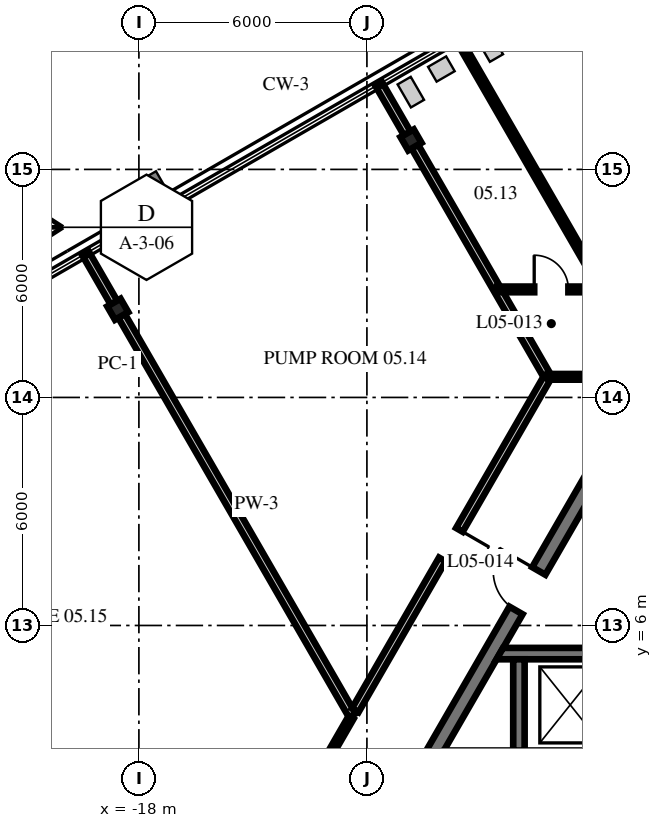
"""IFC4 building model, lengths in metres.
Left out: names, types, materials, properties, quantities, classifications, styles, units other than length and angle.
Written with IfcOpenShell. Run it as: python <this file> out.ifc"""

import sys

from ifc_helpers import new_model, si_unit, direction, frame, frame_2d, origin, origin_2d, place, context, subcontext, project, spatial, polyline, rectangle, i_section, outline, extrude, source, transform, mapped, element, fill, save


model = new_model("IFC4")
c1 = context("Model", 3, precision=1e-05, world=origin(), true_north=direction((0.0, 1.0)))
c2 = subcontext(c1, "Body", "Model", "MODEL_VIEW")
j1 = project(units=[si_unit("LENGTHUNIT", "METRE"), si_unit("PLANEANGLEUNIT", "RADIAN")], contexts=[c1])
p1 = place(None, origin())
s1 = spatial("IfcSite", under=j1, at=p1, CompositionType="ELEMENT")
p2 = place(p1, origin())
s2 = spatial("IfcBuilding", under=s1, at=p2, CompositionType="ELEMENT")
p3 = place(p2, frame((0.0, 0.0, 24.6)))
s3 = spatial("IfcBuildingStorey", under=s2, at=p3, CompositionType="ELEMENT", Elevation=24.6)
m1 = source(origin(), c2, "Body", "SweptSolid", [
    extrude(i_section(OverallWidth=0.404, OverallDepth=0.406, WebThickness=0.027, FlangeThickness=0.044, at=origin_2d()), origin(), (0.0, 0.0, 1.0), 4.3),
])
for number, where, z_axis, x_axis in (
    (1, (-10.84, 18.775, 0.0), (0.0, 0.0, 1.0), (-0.866, -0.5, 0.0)),
    (2, (-18.556, 14.32, 0.0), (0.0, 0.0, 1.0), (-0.866, -0.5, 0.0)),
):
    element("IfcColumn", number, at=place(p3, frame(where, z_axis=z_axis, x_axis=x_axis)), inside=s3, PredefinedType="COLUMN", context=c2, shape_type="MappedRepresentation", body=[
        mapped(m1, transform((0.0, 0.0, 0.0), scale=1.0)),
    ])
m2 = source(origin(), c2, "Body", "SweptSolid", [
    extrude(outline(polyline([(-0.115, -0.2), (11.885, -0.2), (11.654, 0.2), (0.115, 0.2), (-0.115, -0.2)])), origin(), (0.0, 0.0, 1.0), 4.1),
])
p4 = place(p3, frame((-5.885, 10.192, 0.0), z_axis=(0.0, 0.0, 1.0), x_axis=(-0.499996592174, -0.866027371285, 0.0)))
e3 = element("IfcWall", 3, at=p4, inside=s3, PredefinedType="SHEAR", context=c2, shape_type="MappedRepresentation", body=[
    mapped(m2, transform((0.0, 0.0, 0.0), scale=1.0)),
])
p5 = place(p4, frame((3.185, 0.0, 0.0)))
e4 = element("IfcOpeningElement", 4, at=p5, cuts=e3, PredefinedType="OPENING", context=c2, shape_type="SweptSolid", body=[
    extrude(rectangle(XDim=1.2, YDim=2.1, at=frame_2d((0.6, 1.05))), frame((0.0, 0.21, 0.0), z_axis=(0.0, -1.0, 0.0), x_axis=(1.0, 0.0, 0.0)), (0.0, 0.0, 1.0), 0.42),
])
m3 = source(origin(), c2, "Body", "SweptSolid", [
    extrude(outline(polyline([(2.6, -0.15), (-0.44, -0.15), (-0.267, 0.15), (2.6, 0.15), (2.6, -0.15)])), origin(), (0.0, 0.0, 1.0), 4.1),
])
p6 = place(p3, frame((-8.15, 5.26, 0.0), z_axis=(0.0, 0.0, 1.0), x_axis=(1.0, 0.0, 0.0)))
e5 = element("IfcWall", 5, at=p6, inside=s3, PredefinedType="SHEAR", context=c2, shape_type="MappedRepresentation", body=[
    mapped(m3, transform((0.0, 0.0, 0.0), scale=1.0)),
])
m4 = source(origin(), c2, "Body", "SweptSolid", [
    extrude(rectangle(XDim=2.4, YDim=0.3, at=frame_2d((1.2, 0.0))), origin(), (0.0, 0.0, 1.0), 4.1),
])
p7 = place(p3, frame((-8.0, 2.71, 0.0), z_axis=(0.0, 0.0, 1.0), x_axis=(0.0, 1.0, 0.0)))
e6 = element("IfcWall", 6, at=p7, inside=s3, PredefinedType="SHEAR", context=c2, shape_type="MappedRepresentation", body=[
    mapped(m4, transform((0.0, 0.0, 0.0), scale=1.0)),
])
m5 = source(origin(), c2, "Body", "SweptSolid", [
    extrude(rectangle(XDim=1.499, YDim=0.2, at=frame_2d((0.749, 0.0))), origin(), (0.0, 0.0, 1.0), 4.1),
])
p8 = place(p3, frame((-19.402, 15.785, 0.0), z_axis=(0.0, 0.0, 1.0), x_axis=(0.499976292358, -0.866039090965, 0.0)))
e7 = element("IfcWall", 7, at=p8, inside=s3, PredefinedType="PARTITIONING", context=c2, shape_type="MappedRepresentation", body=[
    mapped(m5, transform((0.0, 0.0, 0.0), scale=1.0)),
])
m6 = source(origin(), c2, "Body", "SweptSolid", [
    extrude(rectangle(XDim=12.148, YDim=0.2, at=frame_2d((6.074, 0.0))), origin(), (0.0, 0.0, 1.0), 3.343),
])
p9 = place(p3, frame((-18.459, 14.153, 0.0), z_axis=(0.0, 0.0, 1.0), x_axis=(0.500006022464, -0.866021926685, 0.0)))
e8 = element("IfcWall", 8, at=p9, inside=s3, PredefinedType="PARTITIONING", context=c2, shape_type="MappedRepresentation", body=[
    mapped(m6, transform((0.0, 0.0, 0.0), scale=1.0)),
])
p10 = place(p3, frame((-11.686, 20.24, 0.0), z_axis=(0.0, 0.0, 1.0), x_axis=(0.499976292358, -0.866039090965, 0.0)))
e9 = element("IfcWall", 9, at=p10, inside=s3, PredefinedType="PARTITIONING", context=c2, shape_type="MappedRepresentation", body=[
    mapped(m5, transform((0.0, 0.0, 0.0), scale=1.0)),
])
m7 = source(origin(), c2, "Body", "SweptSolid", [
    extrude(rectangle(XDim=6.934, YDim=0.2, at=frame_2d((3.467, 0.0))), origin(), (0.0, 0.0, 1.0), 3.488),
])
p11 = place(p3, frame((-10.743, 18.608, 0.0), z_axis=(0.0, 0.0, 1.0), x_axis=(0.499986605379, -0.866033137035, 0.0)))
e10 = element("IfcWall", 10, at=p11, inside=s3, PredefinedType="PARTITIONING", context=c2, shape_type="MappedRepresentation", body=[
    mapped(m7, transform((0.0, 0.0, 0.0), scale=1.0)),
])
m8 = source(origin(), c2, "Body", "SweptSolid", [
    extrude(rectangle(XDim=7.509, YDim=0.15, at=frame_2d((3.754, 0.0))), origin(), (0.0, 0.0, 1.0), 4.1),
])
p12 = place(p3, frame((-9.607, 21.44, 0.0), z_axis=(0.0, 0.0, 1.0), x_axis=(0.500006720231, -0.866021523823, 0.0)))
e11 = element("IfcWall", 11, at=p12, inside=s3, PredefinedType="PARTITIONING", context=c2, shape_type="MappedRepresentation", body=[
    mapped(m8, transform((0.0, 0.0, 0.0), scale=1.0)),
])
m9 = source(origin(), c2, "Body", "SweptSolid", [
    extrude(rectangle(XDim=10.155, YDim=0.15, at=frame_2d((5.077, 0.0))), origin(), (0.0, 0.0, 1.0), 4.1),
])
p13 = place(p3, frame((-7.241, 12.542, 0.0), z_axis=(0.0, 0.0, 1.0), x_axis=(1.0, 0.0, 0.0)))
e12 = element("IfcWall", 12, at=p13, inside=s3, PredefinedType="PARTITIONING", context=c2, shape_type="MappedRepresentation", body=[
    mapped(m9, transform((0.0, 0.0, 0.0), scale=1.0)),
])
p14 = place(p13, frame((4.738, 0.0, 0.0)))
e13 = element("IfcOpeningElement", 13, at=p14, cuts=e12, PredefinedType="OPENING", context=c2, shape_type="SweptSolid", body=[
    extrude(rectangle(XDim=0.9, YDim=2.1, at=frame_2d((0.45, 1.05))), frame((0.0, 0.085, 0.0), z_axis=(0.0, -1.0, 0.0), x_axis=(1.0, 0.0, 0.0)), (0.0, 0.0, 1.0), 0.17),
])
m10 = source(origin(), c2, "Body", "SweptSolid", [
    extrude(rectangle(XDim=10.158, YDim=0.15, at=frame_2d((5.079, 0.0))), origin(), (0.0, 0.0, 1.0), 4.1),
])
p15 = place(p3, frame((-8.569, 14.842, 0.0), z_axis=(0.0, 0.0, 1.0), x_axis=(1.0, 0.0, 0.0)))
e14 = element("IfcWall", 14, at=p15, inside=s3, PredefinedType="PARTITIONING", context=c2, shape_type="MappedRepresentation", body=[
    mapped(m10, transform((0.0, 0.0, 0.0), scale=1.0)),
])
p16 = place(p15, frame((8.338, 0.0, 0.0)))
e15 = element("IfcOpeningElement", 15, at=p16, cuts=e14, PredefinedType="OPENING", context=c2, shape_type="SweptSolid", body=[
    extrude(rectangle(XDim=0.9, YDim=2.1, at=frame_2d((0.45, 1.05))), frame((0.0, 0.085, 0.0), z_axis=(0.0, -1.0, 0.0), x_axis=(1.0, 0.0, 0.0)), (0.0, 0.0, 1.0), 0.17),
])
p17 = place(p15, frame((4.531, 0.0, 0.0)))
e16 = element("IfcOpeningElement", 16, at=p17, cuts=e14, PredefinedType="OPENING", context=c2, shape_type="SweptSolid", body=[
    extrude(rectangle(XDim=0.9, YDim=2.1, at=frame_2d((0.45, 1.05))), frame((0.0, 0.085, 0.0), z_axis=(0.0, -1.0, 0.0), x_axis=(1.0, 0.0, 0.0)), (0.0, 0.0, 1.0), 0.17),
])
p18 = place(p15, frame((0.971, 0.0, 0.0)))
e17 = element("IfcOpeningElement", 17, at=p18, cuts=e14, PredefinedType="OPENING", context=c2, shape_type="SweptSolid", body=[
    extrude(rectangle(XDim=0.9, YDim=2.1, at=frame_2d((0.45, 1.05))), frame((0.0, 0.085, 0.0), z_axis=(0.0, -1.0, 0.0), x_axis=(1.0, 0.0, 0.0)), (0.0, 0.0, 1.0), 0.17),
])
m11 = source(origin(), c2, "Body", "SweptSolid", [
    extrude(rectangle(XDim=4.111, YDim=0.15, at=frame_2d((2.056, 0.0))), origin(), (0.0, 0.0, 1.0), 4.1),
])
p19 = place(p3, frame((-14.473, 0.017, 0.0), z_axis=(0.0, 0.0, 1.0), x_axis=(0.500022314862, 0.866012519909, 0.0)))
e18 = element("IfcWall", 18, at=p19, inside=s3, PredefinedType="PARTITIONING", context=c2, shape_type="MappedRepresentation", body=[
    mapped(m11, transform((0.0, 0.0, 0.0), scale=1.0)),
])
p20 = place(p19, frame((1.625, 0.0, 0.0)))
e19 = element("IfcOpeningElement", 19, at=p20, cuts=e18, PredefinedType="OPENING", context=c2, shape_type="SweptSolid", body=[
    extrude(rectangle(XDim=0.9, YDim=2.1, at=frame_2d((0.45, 1.05))), frame((0.0, 0.085, 0.0), z_axis=(0.0, -1.0, 0.0), x_axis=(1.0, 0.0, 0.0)), (0.0, 0.0, 1.0), 0.17),
])
m12 = source(origin(), c2, "Body", "SweptSolid", [
    extrude(rectangle(XDim=10.082, YDim=0.2, at=frame_2d((5.041, 0.0))), origin(), (0.0, 0.0, 1.0), 4.1),
])
p21 = place(p3, frame((-12.307, 3.768, 0.0), z_axis=(0.0, 0.0, 1.0), x_axis=(0.500014523669, 0.866017018378, 0.0)))
e20 = element("IfcWall", 20, at=p21, inside=s3, PredefinedType="PARTITIONING", context=c2, shape_type="MappedRepresentation", body=[
    mapped(m12, transform((0.0, 0.0, 0.0), scale=1.0)),
])
p22 = place(p21, frame((4.582, 0.0, 0.0)))
e21 = element("IfcOpeningElement", 21, at=p22, cuts=e20, PredefinedType="OPENING", context=c2, shape_type="SweptSolid", body=[
    extrude(rectangle(XDim=0.9, YDim=2.1, at=frame_2d((0.45, 1.05))), frame((0.0, 0.11, 0.0), z_axis=(0.0, -1.0, 0.0), x_axis=(1.0, 0.0, 0.0)), (0.0, 0.0, 1.0), 0.22),
])
p23 = place(p5, frame((1.2, 0.0, 0.0), z_axis=(0.0, 0.0, 1.0), x_axis=(-1.0, 0.0, 0.0)))
e22 = element("IfcDoor", 22, at=p23, inside=s3, OperationType="SINGLE_SWING_RIGHT", PredefinedType="DOOR", context=c2, shape_type="SweptSolid", body=[
    extrude(rectangle(XDim=1.2, YDim=2.1, at=frame_2d((0.6, 1.05))), frame((0.0, 0.025, 0.0), z_axis=(0.0, -1.0, 0.0), x_axis=(1.0, 0.0, 0.0)), (0.0, 0.0, 1.0), 0.05),
])
fill(e4, e22)
p24 = place(p18, origin())
e23 = element("IfcDoor", 23, at=p24, inside=s3, OperationType="SINGLE_SWING_LEFT", PredefinedType="DOOR", context=c2, shape_type="SweptSolid", body=[
    extrude(rectangle(XDim=0.9, YDim=2.1, at=frame_2d((0.45, 1.05))), frame((0.0, 0.025, 0.0), z_axis=(0.0, -1.0, 0.0), x_axis=(1.0, 0.0, 0.0)), (0.0, 0.0, 1.0), 0.05),
])
fill(e17, e23)
p25 = place(p22, origin())
e24 = element("IfcDoor", 24, at=p25, inside=s3, OperationType="SINGLE_SWING_RIGHT", PredefinedType="DOOR", context=c2, shape_type="SweptSolid", body=[
    extrude(rectangle(XDim=0.9, YDim=2.1, at=frame_2d((0.45, 1.05))), frame((0.0, 0.025, 0.0), z_axis=(0.0, -1.0, 0.0), x_axis=(1.0, 0.0, 0.0)), (0.0, 0.0, 1.0), 0.05),
])
fill(e21, e24)
save(model, sys.argv[1])
